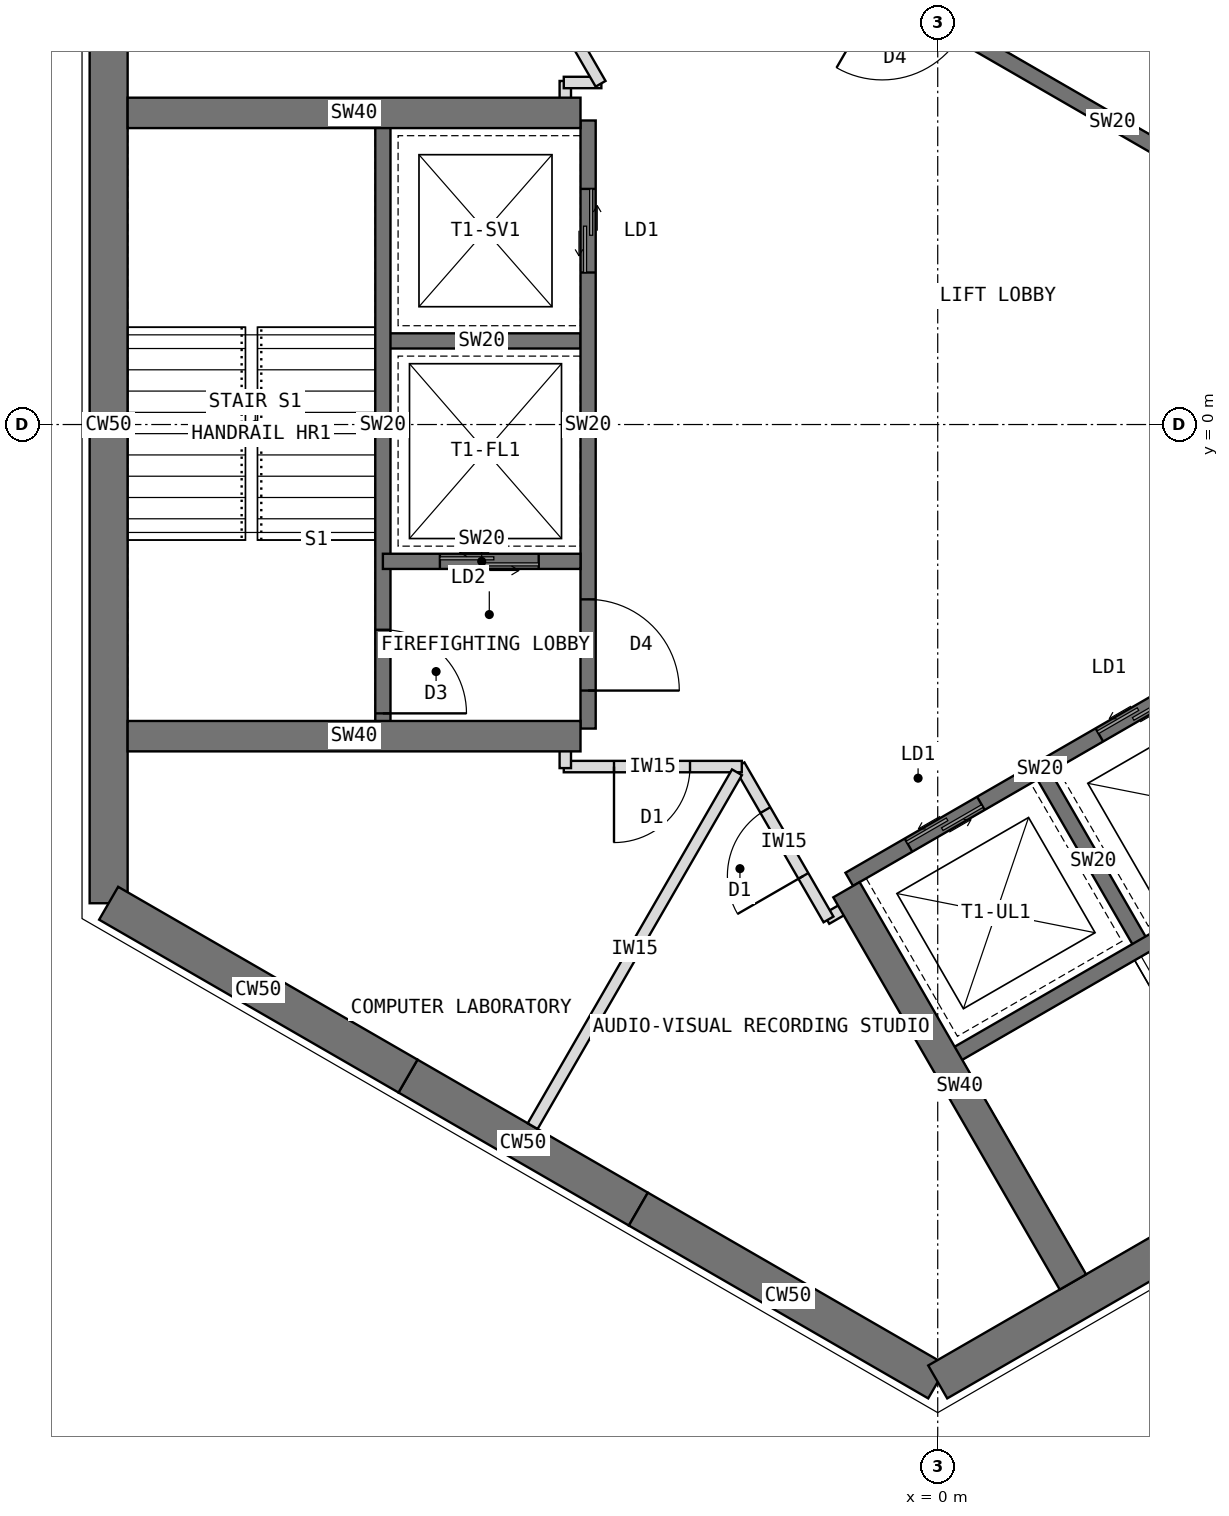
"""IFC4 building model, lengths in metres.
Left out: names, types, materials, properties, quantities, classifications, styles, units other than length and angle.
Written with IfcOpenShell. Run it as: python <this file> out.ifc"""

import sys

from ifc_helpers import new_model, si_unit, direction, frame, frame_2d, origin, place, context, subcontext, project, spatial, rectangle, extrude, element, fill, save


model = new_model("IFC4")
c1 = context("Model", 3, precision=1e-05, world=origin(), true_north=direction((0.0, 1.0)))
c2 = subcontext(c1, "Body", "Model", "MODEL_VIEW")
j1 = project(units=[si_unit("LENGTHUNIT", "METRE"), si_unit("PLANEANGLEUNIT", "RADIAN")], contexts=[c1])
p1 = place(None, origin())
s1 = spatial("IfcSite", under=j1, at=p1, CompositionType="ELEMENT")
p2 = place(p1, origin())
s2 = spatial("IfcBuilding", under=s1, at=p2, CompositionType="ELEMENT")
p3 = place(p2, frame((0.0, 0.0, 174.5)))
s3 = spatial("IfcBuildingStorey", under=s2, at=p3, CompositionType="ELEMENT", Elevation=174.5)
p4 = place(p3, frame((-10.908, 6.298, 0.0), z_axis=(0.0, 0.0, 1.0), x_axis=(0.0, -1.0, 0.0)))
e1 = element("IfcWall", 1, at=p4, inside=s3, PredefinedType="SHEAR", context=c2, shape_type="SweptSolid", body=[
    extrude(rectangle(XDim=12.596, YDim=0.5, at=frame_2d((6.298, 0.0))), origin(), (0.0, 0.0, 1.0), 4.0),
])
p5 = place(p3, frame((-10.908, -6.298, 0.0), z_axis=(0.0, 0.0, 1.0), x_axis=(0.866034513004, -0.499984222037, 0.0)))
e2 = element("IfcWall", 2, at=p5, inside=s3, PredefinedType="SHEAR", context=c2, shape_type="SweptSolid", body=[
    extrude(rectangle(XDim=4.548, YDim=0.5, at=frame_2d((2.274, 0.0))), origin(), (0.0, 0.0, 1.0), 4.0),
])
p6 = place(p3, frame((-6.97, -8.572, 0.0), z_axis=(0.0, 0.0, 1.0), x_axis=(0.866019471182, -0.500010275428, 0.0)))
e3 = element("IfcWall", 3, at=p6, inside=s3, PredefinedType="SHEAR", context=c2, shape_type="SweptSolid", body=[
    extrude(rectangle(XDim=3.5, YDim=0.5, at=frame_2d((1.75, 0.0))), origin(), (0.0, 0.0, 1.0), 4.0),
])
p7 = place(p3, frame((-3.939, -10.322, 0.0), z_axis=(0.0, 0.0, 1.0), x_axis=(0.866011268655, -0.500024481964, 0.0)))
e4 = element("IfcWall", 4, at=p7, inside=s3, PredefinedType="SHEAR", context=c2, shape_type="SweptSolid", body=[
    extrude(rectangle(XDim=4.548, YDim=0.5, at=frame_2d((2.274, 0.0))), origin(), (0.0, 0.0, 1.0), 4.0),
])
p8 = place(p3, frame((0.0, -12.596, 0.0), z_axis=(0.0, 0.0, 1.0), x_axis=(0.866021940709, 0.500005998175, 0.0)))
e5 = element("IfcWall", 5, at=p8, inside=s3, PredefinedType="SHEAR", context=c2, shape_type="SweptSolid", body=[
    extrude(rectangle(XDim=12.596, YDim=0.5, at=frame_2d((6.298, 0.0))), origin(), (0.0, 0.0, 1.0), 4.0),
])
p9 = place(p3, frame((5.764, 1.984, 0.0), z_axis=(0.0, 0.0, 1.0), x_axis=(-0.866026010844, 0.49999894854, 0.0)))
e6 = element("IfcWall", 6, at=p9, inside=s3, PredefinedType="SHEAR", context=c2, shape_type="SweptSolid", body=[
    extrude(rectangle(XDim=8.0, YDim=0.2, at=frame_2d((4.0, 0.0))), origin(), (0.0, 0.0, 1.0), 4.0),
])
p10 = place(p9, frame((6.3, 0.0, 0.0)))
e7 = element("IfcOpeningElement", 7, at=p10, cuts=e6, PredefinedType="OPENING", context=c2, shape_type="SweptSolid", body=[
    extrude(rectangle(XDim=1.2, YDim=2.1, at=frame_2d((0.6, 1.05))), frame((0.0, 0.11, 0.0), z_axis=(0.0, -1.0, 0.0), x_axis=(1.0, 0.0, 0.0)), (0.0, 0.0, 1.0), 0.22),
])
p11 = place(p3, frame((7.114, 4.322, 0.0), z_axis=(0.0, 0.0, 1.0), x_axis=(-0.866026010844, 0.49999894854, 0.0)))
e8 = element("IfcWall", 8, at=p11, inside=s3, PredefinedType="SHEAR", context=c2, shape_type="SweptSolid", body=[
    extrude(rectangle(XDim=8.0, YDim=0.2, at=frame_2d((4.0, 0.0))), origin(), (0.0, 0.0, 1.0), 4.0),
])
p12 = place(p11, frame((6.8, 0.0, 0.0)))
e9 = element("IfcOpeningElement", 9, at=p12, cuts=e8, PredefinedType="OPENING", context=c2, shape_type="SweptSolid", body=[
    extrude(rectangle(XDim=0.9, YDim=2.1, at=frame_2d((0.45, 1.05))), frame((0.0, 0.11, 0.0), z_axis=(0.0, -1.0, 0.0), x_axis=(1.0, 0.0, 0.0)), (0.0, 0.0, 1.0), 0.22),
])
p13 = place(p3, frame((-4.6, 4.0, 0.0), z_axis=(0.0, 0.0, 1.0), x_axis=(0.0, -1.0, 0.0)))
e10 = element("IfcWall", 10, at=p13, inside=s3, PredefinedType="SHEAR", context=c2, shape_type="SweptSolid", body=[
    extrude(rectangle(XDim=8.0, YDim=0.2, at=frame_2d((4.0, 0.0))), origin(), (0.0, 0.0, 1.0), 4.0),
])
p14 = place(p13, frame((6.3, 0.0, 0.0)))
e11 = element("IfcOpeningElement", 11, at=p14, cuts=e10, PredefinedType="OPENING", context=c2, shape_type="SweptSolid", body=[
    extrude(rectangle(XDim=1.2, YDim=2.1, at=frame_2d((0.6, 1.05))), frame((0.0, 0.11, 0.0), z_axis=(0.0, -1.0, 0.0), x_axis=(1.0, 0.0, 0.0)), (0.0, 0.0, 1.0), 0.22),
])
p15 = place(p13, frame((0.9, 0.0, 0.0)))
e12 = element("IfcOpeningElement", 12, at=p15, cuts=e10, PredefinedType="OPENING", context=c2, shape_type="SweptSolid", body=[
    extrude(rectangle(XDim=1.1, YDim=2.2, at=frame_2d((0.55, 1.1))), frame((0.0, 0.11, 0.0), z_axis=(0.0, -1.0, 0.0), x_axis=(1.0, 0.0, 0.0)), (0.0, 0.0, 1.0), 0.22),
])
p16 = place(p3, frame((-4.7, 1.1, 0.0), z_axis=(0.0, 0.0, 1.0), x_axis=(-1.0, 0.0, 0.0)))
e13 = element("IfcWall", 13, at=p16, inside=s3, PredefinedType="SHEAR", context=c2, shape_type="SweptSolid", body=[
    extrude(rectangle(XDim=2.6, YDim=0.2, at=frame_2d((1.3, 0.0))), origin(), (0.0, 0.0, 1.0), 4.0),
])
p17 = place(p3, frame((-4.7, -1.8, 0.0), z_axis=(0.0, 0.0, 1.0), x_axis=(-1.0, 0.0, 0.0)))
e14 = element("IfcWall", 14, at=p17, inside=s3, PredefinedType="SHEAR", context=c2, shape_type="SweptSolid", body=[
    extrude(rectangle(XDim=2.6, YDim=0.2, at=frame_2d((1.3, 0.0))), origin(), (0.0, 0.0, 1.0), 4.0),
])
p18 = place(p17, frame((0.55, 0.0, 0.0)))
e15 = element("IfcOpeningElement", 15, at=p18, cuts=e14, PredefinedType="OPENING", context=c2, shape_type="SweptSolid", body=[
    extrude(rectangle(XDim=1.3, YDim=2.2, at=frame_2d((0.65, 1.1))), frame((0.0, 0.11, 0.0), z_axis=(0.0, -1.0, 0.0), x_axis=(1.0, 0.0, 0.0)), (0.0, 0.0, 1.0), 0.22),
])
p19 = place(p3, frame((-7.3, 4.0, 0.0), z_axis=(0.0, 0.0, 1.0), x_axis=(0.0, -1.0, 0.0)))
e16 = element("IfcWall", 16, at=p19, inside=s3, PredefinedType="SHEAR", context=c2, shape_type="SweptSolid", body=[
    extrude(rectangle(XDim=8.0, YDim=0.2, at=frame_2d((4.0, 0.0))), origin(), (0.0, 0.0, 1.0), 4.0),
])
p20 = place(p19, frame((6.7, 0.0, 0.0)))
e17 = element("IfcOpeningElement", 17, at=p20, cuts=e16, PredefinedType="OPENING", context=c2, shape_type="SweptSolid", body=[
    extrude(rectangle(XDim=1.1, YDim=2.1, at=frame_2d((0.55, 1.05))), frame((0.0, 0.11, 0.0), z_axis=(0.0, -1.0, 0.0), x_axis=(1.0, 0.0, 0.0)), (0.0, 0.0, 1.0), 0.22),
])
for number, where, z_axis, x_axis in (
    (18, (-4.7, -4.1, 0.0), (0.0, 0.0, 1.0), (-1.0, 0.0, 0.0)),
    (19, (-4.7, 4.1, 0.0), (0.0, 0.0, 1.0), (-1.0, 0.0, 0.0)),
):
    element("IfcWall", number, at=place(p3, frame(where, z_axis=z_axis, x_axis=x_axis)), inside=s3, PredefinedType="SHEAR", context=c2, shape_type="SweptSolid", body=[
        extrude(rectangle(XDim=5.958, YDim=0.4, at=frame_2d((2.979, 0.0))), origin(), (0.0, 0.0, 1.0), 4.0),
    ])
p21 = place(p3, frame((-1.164, -5.984, 0.0), z_axis=(0.0, 0.0, 1.0), x_axis=(0.866026010844, 0.49999894854, 0.0)))
e20 = element("IfcWall", 20, at=p21, inside=s3, PredefinedType="SHEAR", context=c2, shape_type="SweptSolid", body=[
    extrude(rectangle(XDim=8.0, YDim=0.2, at=frame_2d((4.0, 0.0))), origin(), (0.0, 0.0, 1.0), 4.0),
])
p22 = place(p21, frame((6.3, 0.0, 0.0)))
e21 = element("IfcOpeningElement", 21, at=p22, cuts=e20, PredefinedType="OPENING", context=c2, shape_type="SweptSolid", body=[
    extrude(rectangle(XDim=1.2, YDim=2.1, at=frame_2d((0.6, 1.05))), frame((0.0, 0.11, 0.0), z_axis=(0.0, -1.0, 0.0), x_axis=(1.0, 0.0, 0.0)), (0.0, 0.0, 1.0), 0.22),
])
p23 = place(p21, frame((0.9, 0.0, 0.0)))
e22 = element("IfcOpeningElement", 22, at=p23, cuts=e20, PredefinedType="OPENING", context=c2, shape_type="SweptSolid", body=[
    extrude(rectangle(XDim=1.1, YDim=2.2, at=frame_2d((0.55, 1.1))), frame((0.0, 0.11, 0.0), z_axis=(0.0, -1.0, 0.0), x_axis=(1.0, 0.0, 0.0)), (0.0, 0.0, 1.0), 0.22),
])
p24 = place(p21, frame((3.8, 0.0, 0.0)))
e23 = element("IfcOpeningElement", 23, at=p24, cuts=e20, PredefinedType="OPENING", context=c2, shape_type="SweptSolid", body=[
    extrude(rectangle(XDim=1.1, YDim=2.2, at=frame_2d((0.55, 1.1))), frame((0.0, 0.11, 0.0), z_axis=(0.0, -1.0, 0.0), x_axis=(1.0, 0.0, 0.0)), (0.0, 0.0, 1.0), 0.22),
])
p25 = place(p3, frame((1.397, -4.62, 0.0), z_axis=(0.0, 0.0, 1.0), x_axis=(0.499936506574, -0.866062058628, 0.0)))
e24 = element("IfcWall", 24, at=p25, inside=s3, PredefinedType="SHEAR", context=c2, shape_type="SweptSolid", body=[
    extrude(rectangle(XDim=2.6, YDim=0.2, at=frame_2d((1.3, 0.0))), origin(), (0.0, 0.0, 1.0), 4.0),
])
p26 = place(p3, frame((0.186, -8.322, 0.0), z_axis=(0.0, 0.0, 1.0), x_axis=(0.866026010844, 0.49999894854, 0.0)))
e25 = element("IfcWall", 25, at=p26, inside=s3, PredefinedType="SHEAR", context=c2, shape_type="SweptSolid", body=[
    extrude(rectangle(XDim=8.0, YDim=0.2, at=frame_2d((4.0, 0.0))), origin(), (0.0, 0.0, 1.0), 4.0),
])
p27 = place(p26, frame((6.7, 0.0, 0.0)))
e26 = element("IfcOpeningElement", 26, at=p27, cuts=e25, PredefinedType="OPENING", context=c2, shape_type="SweptSolid", body=[
    extrude(rectangle(XDim=1.1, YDim=2.1, at=frame_2d((0.55, 1.05))), frame((0.0, 0.11, 0.0), z_axis=(0.0, -1.0, 0.0), x_axis=(1.0, 0.0, 0.0)), (0.0, 0.0, 1.0), 0.22),
])
p28 = place(p3, frame((-1.201, -6.12, 0.0), z_axis=(0.0, 0.0, 1.0), x_axis=(0.500021575205, -0.866012946976, 0.0)))
e27 = element("IfcWall", 27, at=p28, inside=s3, PredefinedType="SHEAR", context=c2, shape_type="SweptSolid", body=[
    extrude(rectangle(XDim=5.958, YDim=0.4, at=frame_2d((2.979, 0.0))), origin(), (0.0, 0.0, 1.0), 4.0),
])
p29 = place(p3, frame((-1.092, -6.289, 0.0), z_axis=(0.0, 0.0, 1.0), x_axis=(-0.866138304741, -0.499804398801, 0.0)))
e28 = element("IfcWall", 28, at=p29, inside=s3, PredefinedType="PARTITIONING", context=c2, shape_type="SweptSolid", body=[
    extrude(rectangle(XDim=0.43, YDim=0.15, at=frame_2d((0.215, 0.0))), origin(), (0.0, 0.0, 1.0), 3.8),
])
p30 = place(p3, frame((-1.437, -6.511, 0.0), z_axis=(0.0, 0.0, 1.0), x_axis=(-0.500074377092, 0.865982457891, 0.0)))
e29 = element("IfcWall", 29, at=p30, inside=s3, PredefinedType="PARTITIONING", context=c2, shape_type="SweptSolid", body=[
    extrude(rectangle(XDim=2.342, YDim=0.15, at=frame_2d((1.171, 0.0))), origin(), (0.0, 0.0, 1.0), 3.8),
])
p31 = place(p30, frame((0.661, 0.0, 0.0)))
e30 = element("IfcOpeningElement", 30, at=p31, cuts=e29, PredefinedType="OPENING", context=c2, shape_type="SweptSolid", body=[
    extrude(rectangle(XDim=1.0, YDim=2.1, at=frame_2d((0.5, 1.05))), frame((0.0, 0.085, 0.0), z_axis=(0.0, -1.0, 0.0), x_axis=(1.0, 0.0, 0.0)), (0.0, 0.0, 1.0), 0.17),
])
p32 = place(p3, frame((-2.578, -4.5, 0.0), z_axis=(0.0, 0.0, 1.0), x_axis=(-1.0, 0.0, 0.0)))
e31 = element("IfcWall", 31, at=p32, inside=s3, PredefinedType="PARTITIONING", context=c2, shape_type="SweptSolid", body=[
    extrude(rectangle(XDim=2.342, YDim=0.15, at=frame_2d((1.171, 0.0))), origin(), (0.0, 0.0, 1.0), 3.8),
])
p33 = place(p32, frame((0.681, 0.0, 0.0)))
e32 = element("IfcOpeningElement", 32, at=p33, cuts=e31, PredefinedType="OPENING", context=c2, shape_type="SweptSolid", body=[
    extrude(rectangle(XDim=1.0, YDim=2.1, at=frame_2d((0.5, 1.05))), frame((0.0, 0.085, 0.0), z_axis=(0.0, -1.0, 0.0), x_axis=(1.0, 0.0, 0.0)), (0.0, 0.0, 1.0), 0.17),
])
for number, where, z_axis, x_axis in (
    (33, (-4.9, -4.52, 0.0), (0.0, 0.0, 1.0), (0.0, 1.0, 0.0)),
    (34, (-4.9, 4.09, 0.0), (0.0, 0.0, 1.0), (0.0, 1.0, 0.0)),
):
    element("IfcWall", number, at=place(p3, frame(where, z_axis=z_axis, x_axis=x_axis)), inside=s3, PredefinedType="PARTITIONING", context=c2, shape_type="SweptSolid", body=[
        extrude(rectangle(XDim=0.43, YDim=0.15, at=frame_2d((0.215, 0.0))), origin(), (0.0, 0.0, 1.0), 3.8),
    ])
p34 = place(p3, frame((-4.92, 4.5, 0.0), z_axis=(0.0, 0.0, 1.0), x_axis=(1.0, 0.0, 0.0)))
e35 = element("IfcWall", 35, at=p34, inside=s3, PredefinedType="PARTITIONING", context=c2, shape_type="SweptSolid", body=[
    extrude(rectangle(XDim=0.494, YDim=0.15, at=frame_2d((0.247, 0.0))), origin(), (0.0, 0.0, 1.0), 3.8),
])
p35 = place(p3, frame((-4.436, 4.483, 0.0), z_axis=(0.0, 0.0, 1.0), x_axis=(-0.500001558674, 0.866024503882, 0.0)))
e36 = element("IfcWall", 36, at=p35, inside=s3, PredefinedType="PARTITIONING", context=c2, shape_type="SweptSolid", body=[
    extrude(rectangle(XDim=4.568, YDim=0.15, at=frame_2d((2.284, 0.0))), origin(), (0.0, 0.0, 1.0), 3.8),
])
p36 = place(p35, frame((1.794, 0.0, 0.0)))
e37 = element("IfcOpeningElement", 37, at=p36, cuts=e36, PredefinedType="OPENING", context=c2, shape_type="SweptSolid", body=[
    extrude(rectangle(XDim=1.0, YDim=2.1, at=frame_2d((0.5, 1.05))), frame((0.0, 0.085, 0.0), z_axis=(0.0, -1.0, 0.0), x_axis=(1.0, 0.0, 0.0)), (0.0, 0.0, 1.0), 0.17),
])
p37 = place(p3, frame((-2.641, -4.575, 0.0), z_axis=(0.0, 0.0, 1.0), x_axis=(-0.499983231807, -0.866035084688, 0.0)))
e38 = element("IfcWall", 38, at=p37, inside=s3, PredefinedType="PARTITIONING", context=c2, shape_type="SweptSolid", body=[
    extrude(rectangle(XDim=5.376, YDim=0.15, at=frame_2d((2.688, 0.0))), origin(), (0.0, 0.0, 1.0), 3.8),
])
p38 = place(p14, origin())
e39 = element("IfcDoor", 39, at=p38, inside=s3, OperationType="SINGLE_SWING_RIGHT", PredefinedType="DOOR", context=c2, shape_type="SweptSolid", body=[
    extrude(rectangle(XDim=1.2, YDim=2.1, at=frame_2d((0.6, 1.05))), frame((0.0, 0.025, 0.0), z_axis=(0.0, -1.0, 0.0), x_axis=(1.0, 0.0, 0.0)), (0.0, 0.0, 1.0), 0.05),
])
fill(e11, e39)
p39 = place(p18, origin())
e40 = element("IfcDoor", 40, at=p39, inside=s3, OperationType="DOUBLE_DOOR_SLIDING", PredefinedType="DOOR", context=c2, shape_type="SweptSolid", body=[
    extrude(rectangle(XDim=1.3, YDim=2.2, at=frame_2d((0.65, 1.1))), frame((0.0, 0.025, 0.0), z_axis=(0.0, -1.0, 0.0), x_axis=(1.0, 0.0, 0.0)), (0.0, 0.0, 1.0), 0.05),
])
fill(e15, e40)
p40 = place(p15, origin())
e41 = element("IfcDoor", 41, at=p40, inside=s3, OperationType="DOUBLE_DOOR_SLIDING", PredefinedType="DOOR", context=c2, shape_type="SweptSolid", body=[
    extrude(rectangle(XDim=1.1, YDim=2.2, at=frame_2d((0.55, 1.1))), frame((0.0, 0.025, 0.0), z_axis=(0.0, -1.0, 0.0), x_axis=(1.0, 0.0, 0.0)), (0.0, 0.0, 1.0), 0.05),
])
fill(e12, e41)
p41 = place(p20, origin())
e42 = element("IfcDoor", 42, at=p41, inside=s3, OperationType="SINGLE_SWING_RIGHT", PredefinedType="DOOR", context=c2, shape_type="SweptSolid", body=[
    extrude(rectangle(XDim=1.1, YDim=2.1, at=frame_2d((0.55, 1.05))), frame((0.0, 0.025, 0.0), z_axis=(0.0, -1.0, 0.0), x_axis=(1.0, 0.0, 0.0)), (0.0, 0.0, 1.0), 0.05),
])
fill(e17, e42)
p42 = place(p23, origin())
e43 = element("IfcDoor", 43, at=p42, inside=s3, OperationType="DOUBLE_DOOR_SLIDING", PredefinedType="DOOR", context=c2, shape_type="SweptSolid", body=[
    extrude(rectangle(XDim=1.1, YDim=2.2, at=frame_2d((0.55, 1.1))), frame((0.0, 0.025, 0.0), z_axis=(0.0, -1.0, 0.0), x_axis=(1.0, 0.0, 0.0)), (0.0, 0.0, 1.0), 0.05),
])
fill(e22, e43)
p43 = place(p24, origin())
e44 = element("IfcDoor", 44, at=p43, inside=s3, OperationType="DOUBLE_DOOR_SLIDING", PredefinedType="DOOR", context=c2, shape_type="SweptSolid", body=[
    extrude(rectangle(XDim=1.1, YDim=2.2, at=frame_2d((0.55, 1.1))), frame((0.0, 0.025, 0.0), z_axis=(0.0, -1.0, 0.0), x_axis=(1.0, 0.0, 0.0)), (0.0, 0.0, 1.0), 0.05),
])
fill(e23, e44)
p44 = place(p33, origin())
e45 = element("IfcDoor", 45, at=p44, inside=s3, OperationType="SINGLE_SWING_RIGHT", PredefinedType="DOOR", context=c2, shape_type="SweptSolid", body=[
    extrude(rectangle(XDim=1.0, YDim=2.1, at=frame_2d((0.5, 1.05))), frame((0.0, 0.025, 0.0), z_axis=(0.0, -1.0, 0.0), x_axis=(1.0, 0.0, 0.0)), (0.0, 0.0, 1.0), 0.05),
])
fill(e32, e45)
p45 = place(p31, origin())
e46 = element("IfcDoor", 46, at=p45, inside=s3, OperationType="SINGLE_SWING_LEFT", PredefinedType="DOOR", context=c2, shape_type="SweptSolid", body=[
    extrude(rectangle(XDim=1.0, YDim=2.1, at=frame_2d((0.5, 1.05))), frame((0.0, 0.025, 0.0), z_axis=(0.0, -1.0, 0.0), x_axis=(1.0, 0.0, 0.0)), (0.0, 0.0, 1.0), 0.05),
])
fill(e30, e46)
save(model, sys.argv[1])
